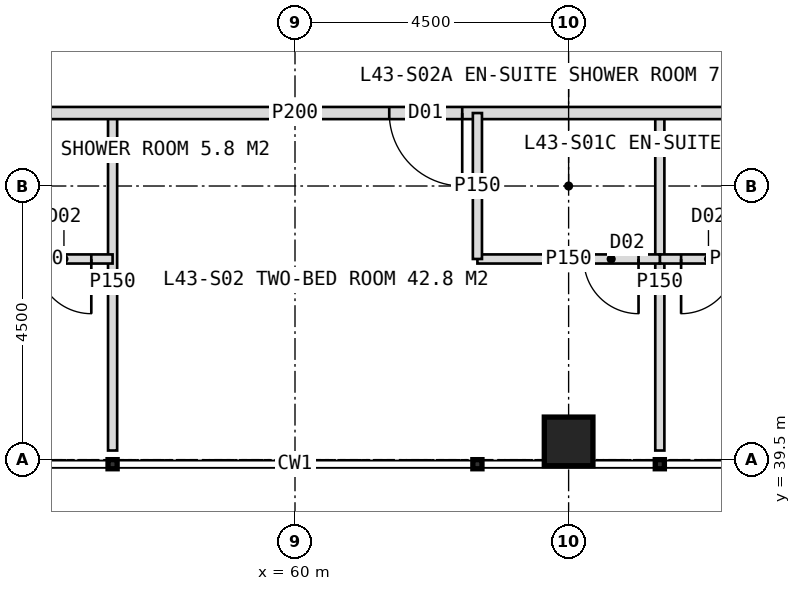
"""IFC4 building model, lengths in metres.
Left out: names, types, materials, properties, quantities, classifications, styles, units other than length and angle.
Written with IfcOpenShell. Run it as: python <this file> out.ifc"""

import sys

from ifc_helpers import new_model, si_unit, direction, frame, frame_2d, origin, origin_2d, place, context, subcontext, project, spatial, rectangle, hollow_rectangle, extrude, element, fill, save


model = new_model("IFC4")
c1 = context("Model", 3, precision=1e-05, world=origin(), true_north=direction((0.0, 1.0)))
c2 = subcontext(c1, "Body", "Model", "MODEL_VIEW")
j1 = project(units=[si_unit("LENGTHUNIT", "METRE"), si_unit("PLANEANGLEUNIT", "RADIAN")], contexts=[c1])
p1 = place(None, origin())
s1 = spatial("IfcSite", under=j1, at=p1, CompositionType="ELEMENT")
p2 = place(p1, origin())
s2 = spatial("IfcBuilding", under=s1, at=p2, CompositionType="ELEMENT")
p3 = place(p2, frame((0.0, 0.0, 181.0)))
s3 = spatial("IfcBuildingStorey", under=s2, at=p3, CompositionType="ELEMENT", Elevation=181.0)
p4 = place(p3, frame((64.5, 39.8, 0.0), z_axis=(0.0, 0.0, 1.0), x_axis=(1.0, 0.0, 0.0)))
e1 = element("IfcColumn", 1, at=p4, inside=s3, PredefinedType="COLUMN", context=c2, shape_type="SweptSolid", body=[
    extrude(hollow_rectangle(XDim=0.8, YDim=0.8, WallThickness=0.08, at=origin_2d()), origin(), (0.0, 0.0, 1.0), 4.0),
])
for number, where, z_axis, x_axis in (
    (2, (66.0, 45.2, 0.0), (0.0, 0.0, 1.0), (0.0, -1.0, 0.0)),
    (3, (57.0, 45.2, 0.0), (0.0, 0.0, 1.0), (0.0, -1.0, 0.0)),
):
    element("IfcWall", number, at=place(p3, frame(where, z_axis=z_axis, x_axis=x_axis)), inside=s3, PredefinedType="PARTITIONING", context=c2, shape_type="SweptSolid", body=[
        extrude(rectangle(XDim=5.55, YDim=0.15, at=frame_2d((2.775, 0.0))), origin(), (0.0, 0.0, 1.0), 3.75),
    ])
p5 = place(p3, frame((76.8, 45.2, 0.0), z_axis=(0.0, 0.0, 1.0), x_axis=(-1.0, 0.0, 0.0)))
e4 = element("IfcWall", 4, at=p5, inside=s3, PredefinedType="PARTITIONING", context=c2, shape_type="SweptSolid", body=[
    extrude(rectangle(XDim=33.6, YDim=0.2, at=frame_2d((16.8, 0.0))), origin(), (0.0, 0.0, 1.0), 3.75),
])
p6 = place(p5, frame((2.65, 0.0, 0.0)))
e5 = element("IfcOpeningElement", 5, at=p6, cuts=e4, PredefinedType="OPENING", context=c2, shape_type="SweptSolid", body=[
    extrude(rectangle(XDim=1.2, YDim=2.2, at=frame_2d((0.6, 1.1))), frame((0.0, 0.11, 0.0), z_axis=(0.0, -1.0, 0.0), x_axis=(1.0, 0.0, 0.0)), (0.0, 0.0, 1.0), 0.22),
])
p7 = place(p5, frame((14.05, 0.0, 0.0)))
e6 = element("IfcOpeningElement", 6, at=p7, cuts=e4, PredefinedType="OPENING", context=c2, shape_type="SweptSolid", body=[
    extrude(rectangle(XDim=1.2, YDim=2.2, at=frame_2d((0.6, 1.1))), frame((0.0, 0.11, 0.0), z_axis=(0.0, -1.0, 0.0), x_axis=(1.0, 0.0, 0.0)), (0.0, 0.0, 1.0), 0.22),
])
p8 = place(p5, frame((22.45, 0.0, 0.0)))
e7 = element("IfcOpeningElement", 7, at=p8, cuts=e4, PredefinedType="OPENING", context=c2, shape_type="SweptSolid", body=[
    extrude(rectangle(XDim=1.2, YDim=2.2, at=frame_2d((0.6, 1.1))), frame((0.0, 0.11, 0.0), z_axis=(0.0, -1.0, 0.0), x_axis=(1.0, 0.0, 0.0)), (0.0, 0.0, 1.0), 0.22),
])
p9 = place(p3, frame((68.4, 42.8, 0.0), z_axis=(0.0, 0.0, 1.0), x_axis=(-1.0, 0.0, 0.0)))
e8 = element("IfcWall", 8, at=p9, inside=s3, PredefinedType="PARTITIONING", context=c2, shape_type="SweptSolid", body=[
    extrude(rectangle(XDim=2.4, YDim=0.15, at=frame_2d((1.2, 0.0))), origin(), (0.0, 0.0, 1.0), 3.75),
])
p10 = place(p9, frame((1.15, 0.0, 0.0)))
e9 = element("IfcOpeningElement", 9, at=p10, cuts=e8, PredefinedType="OPENING", context=c2, shape_type="SweptSolid", body=[
    extrude(rectangle(XDim=0.9, YDim=2.1, at=frame_2d((0.45, 1.05))), frame((0.0, 0.085, 0.0), z_axis=(0.0, -1.0, 0.0), x_axis=(1.0, 0.0, 0.0)), (0.0, 0.0, 1.0), 0.17),
])
p11 = place(p3, frame((66.0, 42.8, 0.0), z_axis=(0.0, 0.0, 1.0), x_axis=(-1.0, 0.0, 0.0)))
e10 = element("IfcWall", 10, at=p11, inside=s3, PredefinedType="PARTITIONING", context=c2, shape_type="SweptSolid", body=[
    extrude(rectangle(XDim=3.0, YDim=0.15, at=frame_2d((1.5, 0.0))), origin(), (0.0, 0.0, 1.0), 3.75),
])
p12 = place(p11, frame((0.35, 0.0, 0.0)))
e11 = element("IfcOpeningElement", 11, at=p12, cuts=e10, PredefinedType="OPENING", context=c2, shape_type="SweptSolid", body=[
    extrude(rectangle(XDim=0.9, YDim=2.1, at=frame_2d((0.45, 1.05))), frame((0.0, 0.085, 0.0), z_axis=(0.0, -1.0, 0.0), x_axis=(1.0, 0.0, 0.0)), (0.0, 0.0, 1.0), 0.17),
])
p13 = place(p3, frame((63.0, 45.2, 0.0), z_axis=(0.0, 0.0, 1.0), x_axis=(0.0, -1.0, 0.0)))
e12 = element("IfcWall", 12, at=p13, inside=s3, PredefinedType="PARTITIONING", context=c2, shape_type="SweptSolid", body=[
    extrude(rectangle(XDim=2.4, YDim=0.15, at=frame_2d((1.2, 0.0))), origin(), (0.0, 0.0, 1.0), 3.75),
])
p14 = place(p3, frame((57.0, 42.8, 0.0), z_axis=(0.0, 0.0, 1.0), x_axis=(-1.0, 0.0, 0.0)))
e13 = element("IfcWall", 13, at=p14, inside=s3, PredefinedType="PARTITIONING", context=c2, shape_type="SweptSolid", body=[
    extrude(rectangle(XDim=2.4, YDim=0.15, at=frame_2d((1.2, 0.0))), origin(), (0.0, 0.0, 1.0), 3.75),
])
p15 = place(p14, frame((0.35, 0.0, 0.0)))
e14 = element("IfcOpeningElement", 14, at=p15, cuts=e13, PredefinedType="OPENING", context=c2, shape_type="SweptSolid", body=[
    extrude(rectangle(XDim=0.9, YDim=2.1, at=frame_2d((0.45, 1.05))), frame((0.0, 0.085, 0.0), z_axis=(0.0, -1.0, 0.0), x_axis=(1.0, 0.0, 0.0)), (0.0, 0.0, 1.0), 0.17),
])
p16 = place(p10, origin())
e15 = element("IfcDoor", 15, at=p16, inside=s3, OperationType="SINGLE_SWING_RIGHT", PredefinedType="DOOR", context=c2, shape_type="SweptSolid", body=[
    extrude(rectangle(XDim=0.9, YDim=2.1, at=frame_2d((0.45, 1.05))), frame((0.0, 0.025, 0.0), z_axis=(0.0, -1.0, 0.0), x_axis=(1.0, 0.0, 0.0)), (0.0, 0.0, 1.0), 0.05),
])
fill(e9, e15)
p17 = place(p7, origin())
e16 = element("IfcDoor", 16, at=p17, inside=s3, OperationType="SINGLE_SWING_LEFT", PredefinedType="DOOR", context=c2, shape_type="SweptSolid", body=[
    extrude(rectangle(XDim=1.2, YDim=2.2, at=frame_2d((0.6, 1.1))), frame((0.0, 0.025, 0.0), z_axis=(0.0, -1.0, 0.0), x_axis=(1.0, 0.0, 0.0)), (0.0, 0.0, 1.0), 0.05),
])
fill(e6, e16)
p18 = place(p12, origin())
e17 = element("IfcDoor", 17, at=p18, inside=s3, OperationType="SINGLE_SWING_LEFT", PredefinedType="DOOR", context=c2, shape_type="SweptSolid", body=[
    extrude(rectangle(XDim=0.9, YDim=2.1, at=frame_2d((0.45, 1.05))), frame((0.0, 0.025, 0.0), z_axis=(0.0, -1.0, 0.0), x_axis=(1.0, 0.0, 0.0)), (0.0, 0.0, 1.0), 0.05),
])
fill(e11, e17)
p19 = place(p15, origin())
e18 = element("IfcDoor", 18, at=p19, inside=s3, OperationType="SINGLE_SWING_LEFT", PredefinedType="DOOR", context=c2, shape_type="SweptSolid", body=[
    extrude(rectangle(XDim=0.9, YDim=2.1, at=frame_2d((0.45, 1.05))), frame((0.0, 0.025, 0.0), z_axis=(0.0, -1.0, 0.0), x_axis=(1.0, 0.0, 0.0)), (0.0, 0.0, 1.0), 0.05),
])
fill(e14, e18)
save(model, sys.argv[1])
